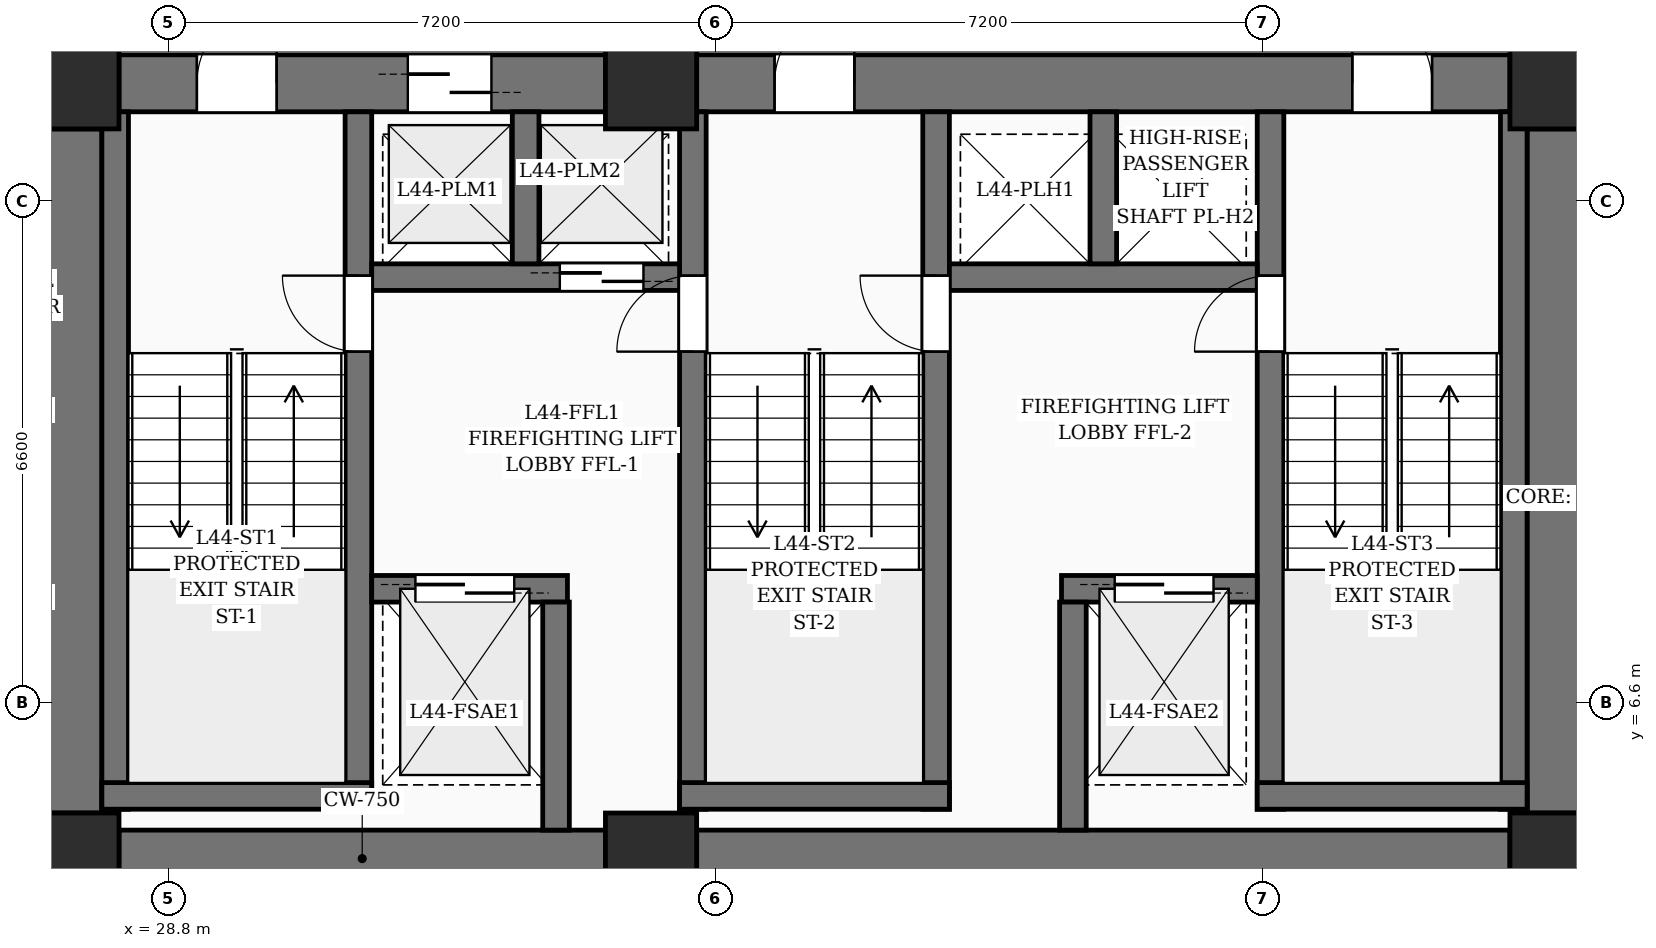
"""IFC4 building model, lengths in metres.
Left out: names, types, materials, properties, quantities, classifications, styles, units other than length and angle.
Written with IfcOpenShell. Run it as: python <this file> out.ifc"""

import sys

from ifc_helpers import new_model, si_unit, direction, frame, frame_2d, origin, origin_2d, place, context, subcontext, project, spatial, rectangle, extrude, element, fill, save


model = new_model("IFC4")
c1 = context("Model", 3, precision=1e-05, world=origin(), true_north=direction((0.0, 1.0)))
c2 = subcontext(c1, "Body", "Model", "MODEL_VIEW")
j1 = project(units=[si_unit("LENGTHUNIT", "METRE"), si_unit("PLANEANGLEUNIT", "RADIAN")], contexts=[c1])
p1 = place(None, origin())
s1 = spatial("IfcSite", under=j1, at=p1, CompositionType="ELEMENT")
p2 = place(p1, origin())
s2 = spatial("IfcBuilding", under=s1, at=p2, CompositionType="ELEMENT")
p3 = place(p2, frame((0.0, 0.0, 171.6)))
s3 = spatial("IfcBuildingStorey", under=s2, at=p3, CompositionType="ELEMENT", Elevation=171.6)
for number, where, z_axis, x_axis in (
    (1, (27.55, 4.55, 0.0), (0.0, 0.0, 1.0), (1.0, 0.0, 0.0)),
    (2, (35.15, 4.55, 0.0), (0.0, 0.0, 1.0), (1.0, 0.0, 0.0)),
    (3, (47.05, 4.55, 0.0), (0.0, 0.0, 1.0), (1.0, 0.0, 0.0)),
    (4, (27.55, 14.75, 0.0), (0.0, 0.0, 1.0), (1.0, 0.0, 0.0)),
    (5, (35.15, 14.75, 0.0), (0.0, 0.0, 1.0), (1.0, 0.0, 0.0)),
    (6, (47.05, 14.75, 0.0), (0.0, 0.0, 1.0), (1.0, 0.0, 0.0)),
):
    element("IfcColumn", number, at=place(p3, frame(where, z_axis=z_axis, x_axis=x_axis)), inside=s3, PredefinedType="COLUMN", context=c2, shape_type="SweptSolid", body=[
        extrude(rectangle(XDim=1.2, YDim=1.2, at=origin_2d()), origin(), (0.0, 0.0, 1.0), 3.6),
    ])
p4 = place(p3, frame((28.15, 4.55, 0.0), z_axis=(0.0, 0.0, 1.0), x_axis=(1.0, 0.0, 0.0)))
e7 = element("IfcWall", 7, at=p4, inside=s3, PredefinedType="SHEAR", context=c2, shape_type="SweptSolid", body=[
    extrude(rectangle(XDim=6.4, YDim=0.75, at=frame_2d((3.2, 0.0))), origin(), (0.0, 0.0, 1.0), 3.6),
])
p5 = place(p3, frame((35.75, 4.55, 0.0), z_axis=(0.0, 0.0, 1.0), x_axis=(1.0, 0.0, 0.0)))
e8 = element("IfcWall", 8, at=p5, inside=s3, PredefinedType="SHEAR", context=c2, shape_type="SweptSolid", body=[
    extrude(rectangle(XDim=10.7, YDim=0.75, at=frame_2d((5.35, 0.0))), origin(), (0.0, 0.0, 1.0), 3.6),
])
p6 = place(p3, frame((28.15, 14.75, 0.0), z_axis=(0.0, 0.0, 1.0), x_axis=(1.0, 0.0, 0.0)))
e9 = element("IfcWall", 9, at=p6, inside=s3, PredefinedType="SHEAR", context=c2, shape_type="SweptSolid", body=[
    extrude(rectangle(XDim=6.4, YDim=0.75, at=frame_2d((3.2, 0.0))), origin(), (0.0, 0.0, 1.0), 3.6),
])
p7 = place(p6, frame((1.025, 0.0, 0.0)))
e10 = element("IfcOpeningElement", 10, at=p7, cuts=e9, PredefinedType="OPENING", context=c2, shape_type="SweptSolid", body=[
    extrude(rectangle(XDim=1.05, YDim=2.15, at=frame_2d((0.525, 1.075))), frame((0.0, 0.385, 0.0), z_axis=(0.0, -1.0, 0.0), x_axis=(1.0, 0.0, 0.0)), (0.0, 0.0, 1.0), 0.77),
])
p8 = place(p6, frame((3.8, 0.0, 0.0)))
e11 = element("IfcOpeningElement", 11, at=p8, cuts=e9, PredefinedType="OPENING", context=c2, shape_type="SweptSolid", body=[
    extrude(rectangle(XDim=1.1, YDim=2.2, at=frame_2d((0.55, 1.1))), frame((0.0, 0.385, 0.0), z_axis=(0.0, -1.0, 0.0), x_axis=(1.0, 0.0, 0.0)), (0.0, 0.0, 1.0), 0.77),
])
p9 = place(p3, frame((35.75, 14.75, 0.0), z_axis=(0.0, 0.0, 1.0), x_axis=(1.0, 0.0, 0.0)))
e12 = element("IfcWall", 12, at=p9, inside=s3, PredefinedType="SHEAR", context=c2, shape_type="SweptSolid", body=[
    extrude(rectangle(XDim=10.7, YDim=0.75, at=frame_2d((5.35, 0.0))), origin(), (0.0, 0.0, 1.0), 3.6),
])
p10 = place(p9, frame((1.025, 0.0, 0.0)))
e13 = element("IfcOpeningElement", 13, at=p10, cuts=e12, PredefinedType="OPENING", context=c2, shape_type="SweptSolid", body=[
    extrude(rectangle(XDim=1.05, YDim=2.15, at=frame_2d((0.525, 1.075))), frame((0.0, 0.385, 0.0), z_axis=(0.0, -1.0, 0.0), x_axis=(1.0, 0.0, 0.0)), (0.0, 0.0, 1.0), 0.77),
])
p11 = place(p9, frame((8.625, 0.0, 0.0)))
e14 = element("IfcOpeningElement", 14, at=p11, cuts=e12, PredefinedType="OPENING", context=c2, shape_type="SweptSolid", body=[
    extrude(rectangle(XDim=1.05, YDim=2.15, at=frame_2d((0.525, 1.075))), frame((0.0, 0.385, 0.0), z_axis=(0.0, -1.0, 0.0), x_axis=(1.0, 0.0, 0.0)), (0.0, 0.0, 1.0), 0.77),
])
for number, where, z_axis, x_axis in (
    (15, (27.55, 5.15, 0.0), (0.0, 0.0, 1.0), (0.0, 1.0, 0.0)),
    (16, (47.05, 5.15, 0.0), (0.0, 0.0, 1.0), (0.0, 1.0, 0.0)),
):
    element("IfcWall", number, at=place(p3, frame(where, z_axis=z_axis, x_axis=x_axis)), inside=s3, PredefinedType="SHEAR", context=c2, shape_type="SweptSolid", body=[
        extrude(rectangle(XDim=9.0, YDim=0.75, at=frame_2d((4.5, 0.0))), origin(), (0.0, 0.0, 1.0), 3.6),
    ])
p12 = place(p3, frame((28.1, 5.2, 0.0), z_axis=(0.0, 0.0, 1.0), x_axis=(0.0, 1.0, 0.0)))
e17 = element("IfcWall", 17, at=p12, inside=s3, PredefinedType="SOLIDWALL", context=c2, shape_type="SweptSolid", body=[
    extrude(rectangle(XDim=9.175, YDim=0.35, at=frame_2d((4.587, 0.0))), origin(), (0.0, 0.0, 1.0), 3.6),
])
p13 = place(p3, frame((31.3, 5.2, 0.0), z_axis=(0.0, 0.0, 1.0), x_axis=(0.0, 1.0, 0.0)))
e18 = element("IfcWall", 18, at=p13, inside=s3, PredefinedType="SOLIDWALL", context=c2, shape_type="SweptSolid", body=[
    extrude(rectangle(XDim=9.175, YDim=0.35, at=frame_2d((4.587, 0.0))), origin(), (0.0, 0.0, 1.0), 3.6),
])
p14 = place(p13, frame((6.02, 0.0, 0.0)))
e19 = element("IfcOpeningElement", 19, at=p14, cuts=e18, PredefinedType="OPENING", context=c2, shape_type="SweptSolid", body=[
    extrude(rectangle(XDim=1.0, YDim=2.15, at=frame_2d((0.5, 1.075))), frame((0.0, 0.185, 0.0), z_axis=(0.0, -1.0, 0.0), x_axis=(1.0, 0.0, 0.0)), (0.0, 0.0, 1.0), 0.37),
])
p15 = place(p3, frame((27.925, 5.375, 0.0), z_axis=(0.0, 0.0, 1.0), x_axis=(1.0, 0.0, 0.0)))
e20 = element("IfcWall", 20, at=p15, inside=s3, PredefinedType="SOLIDWALL", context=c2, shape_type="SweptSolid", body=[
    extrude(rectangle(XDim=3.55, YDim=0.35, at=frame_2d((1.775, 0.0))), origin(), (0.0, 0.0, 1.0), 3.6),
])
p16 = place(p3, frame((35.7, 5.2, 0.0), z_axis=(0.0, 0.0, 1.0), x_axis=(0.0, 1.0, 0.0)))
e21 = element("IfcWall", 21, at=p16, inside=s3, PredefinedType="SOLIDWALL", context=c2, shape_type="SweptSolid", body=[
    extrude(rectangle(XDim=9.175, YDim=0.35, at=frame_2d((4.587, 0.0))), origin(), (0.0, 0.0, 1.0), 3.6),
])
p17 = place(p16, frame((6.02, 0.0, 0.0)))
e22 = element("IfcOpeningElement", 22, at=p17, cuts=e21, PredefinedType="OPENING", context=c2, shape_type="SweptSolid", body=[
    extrude(rectangle(XDim=1.0, YDim=2.15, at=frame_2d((0.5, 1.075))), frame((0.0, 0.185, 0.0), z_axis=(0.0, -1.0, 0.0), x_axis=(1.0, 0.0, 0.0)), (0.0, 0.0, 1.0), 0.37),
])
p18 = place(p3, frame((38.9, 5.2, 0.0), z_axis=(0.0, 0.0, 1.0), x_axis=(0.0, 1.0, 0.0)))
e23 = element("IfcWall", 23, at=p18, inside=s3, PredefinedType="SOLIDWALL", context=c2, shape_type="SweptSolid", body=[
    extrude(rectangle(XDim=9.175, YDim=0.35, at=frame_2d((4.587, 0.0))), origin(), (0.0, 0.0, 1.0), 3.6),
])
p19 = place(p18, frame((6.02, 0.0, 0.0)))
e24 = element("IfcOpeningElement", 24, at=p19, cuts=e23, PredefinedType="OPENING", context=c2, shape_type="SweptSolid", body=[
    extrude(rectangle(XDim=1.0, YDim=2.15, at=frame_2d((0.5, 1.075))), frame((0.0, 0.185, 0.0), z_axis=(0.0, -1.0, 0.0), x_axis=(1.0, 0.0, 0.0)), (0.0, 0.0, 1.0), 0.37),
])
p20 = place(p3, frame((35.525, 5.375, 0.0), z_axis=(0.0, 0.0, 1.0), x_axis=(1.0, 0.0, 0.0)))
e25 = element("IfcWall", 25, at=p20, inside=s3, PredefinedType="SOLIDWALL", context=c2, shape_type="SweptSolid", body=[
    extrude(rectangle(XDim=3.55, YDim=0.35, at=frame_2d((1.775, 0.0))), origin(), (0.0, 0.0, 1.0), 3.6),
])
p21 = place(p3, frame((43.3, 5.2, 0.0), z_axis=(0.0, 0.0, 1.0), x_axis=(0.0, 1.0, 0.0)))
e26 = element("IfcWall", 26, at=p21, inside=s3, PredefinedType="SOLIDWALL", context=c2, shape_type="SweptSolid", body=[
    extrude(rectangle(XDim=9.175, YDim=0.35, at=frame_2d((4.587, 0.0))), origin(), (0.0, 0.0, 1.0), 3.6),
])
p22 = place(p21, frame((6.02, 0.0, 0.0)))
e27 = element("IfcOpeningElement", 27, at=p22, cuts=e26, PredefinedType="OPENING", context=c2, shape_type="SweptSolid", body=[
    extrude(rectangle(XDim=1.0, YDim=2.15, at=frame_2d((0.5, 1.075))), frame((0.0, 0.185, 0.0), z_axis=(0.0, -1.0, 0.0), x_axis=(1.0, 0.0, 0.0)), (0.0, 0.0, 1.0), 0.37),
])
p23 = place(p3, frame((46.5, 5.2, 0.0), z_axis=(0.0, 0.0, 1.0), x_axis=(0.0, 1.0, 0.0)))
e28 = element("IfcWall", 28, at=p23, inside=s3, PredefinedType="SOLIDWALL", context=c2, shape_type="SweptSolid", body=[
    extrude(rectangle(XDim=9.175, YDim=0.35, at=frame_2d((4.587, 0.0))), origin(), (0.0, 0.0, 1.0), 3.6),
])
p24 = place(p3, frame((43.125, 5.375, 0.0), z_axis=(0.0, 0.0, 1.0), x_axis=(1.0, 0.0, 0.0)))
e29 = element("IfcWall", 29, at=p24, inside=s3, PredefinedType="SOLIDWALL", context=c2, shape_type="SweptSolid", body=[
    extrude(rectangle(XDim=3.55, YDim=0.35, at=frame_2d((1.775, 0.0))), origin(), (0.0, 0.0, 1.0), 3.6),
])
p25 = place(p3, frame((31.475, 8.1, 0.0), z_axis=(0.0, 0.0, 1.0), x_axis=(1.0, 0.0, 0.0)))
e30 = element("IfcWall", 30, at=p25, inside=s3, PredefinedType="SOLIDWALL", context=c2, shape_type="SweptSolid", body=[
    extrude(rectangle(XDim=2.575, YDim=0.35, at=frame_2d((1.288, 0.0))), origin(), (0.0, 0.0, 1.0), 3.6),
])
p26 = place(p25, frame((0.575, 0.0, 0.0)))
e31 = element("IfcOpeningElement", 31, at=p26, cuts=e30, PredefinedType="OPENING", context=c2, shape_type="SweptSolid", body=[
    extrude(rectangle(XDim=1.3, YDim=2.25, at=frame_2d((0.65, 1.125))), frame((0.0, 0.185, 0.0), z_axis=(0.0, -1.0, 0.0), x_axis=(1.0, 0.0, 0.0)), (0.0, 0.0, 1.0), 0.37),
])
p27 = place(p3, frame((40.55, 8.1, 0.0), z_axis=(0.0, 0.0, 1.0), x_axis=(1.0, 0.0, 0.0)))
e32 = element("IfcWall", 32, at=p27, inside=s3, PredefinedType="SOLIDWALL", context=c2, shape_type="SweptSolid", body=[
    extrude(rectangle(XDim=2.575, YDim=0.35, at=frame_2d((1.288, 0.0))), origin(), (0.0, 0.0, 1.0), 3.6),
])
p28 = place(p27, frame((0.7, 0.0, 0.0)))
e33 = element("IfcOpeningElement", 33, at=p28, cuts=e32, PredefinedType="OPENING", context=c2, shape_type="SweptSolid", body=[
    extrude(rectangle(XDim=1.3, YDim=2.25, at=frame_2d((0.65, 1.125))), frame((0.0, 0.185, 0.0), z_axis=(0.0, -1.0, 0.0), x_axis=(1.0, 0.0, 0.0)), (0.0, 0.0, 1.0), 0.37),
])
for number, where, z_axis, x_axis in (
    (34, (33.9, 4.925, 0.0), (0.0, 0.0, 1.0), (0.0, 1.0, 0.0)),
    (35, (40.7, 4.925, 0.0), (0.0, 0.0, 1.0), (0.0, 1.0, 0.0)),
):
    element("IfcWall", number, at=place(p3, frame(where, z_axis=z_axis, x_axis=x_axis)), inside=s3, PredefinedType="SOLIDWALL", context=c2, shape_type="SweptSolid", body=[
        extrude(rectangle(XDim=3.0, YDim=0.35, at=frame_2d((1.5, 0.0))), origin(), (0.0, 0.0, 1.0), 3.6),
    ])
p29 = place(p3, frame((31.475, 12.2, 0.0), z_axis=(0.0, 0.0, 1.0), x_axis=(1.0, 0.0, 0.0)))
e36 = element("IfcWall", 36, at=p29, inside=s3, PredefinedType="SOLIDWALL", context=c2, shape_type="SweptSolid", body=[
    extrude(rectangle(XDim=4.05, YDim=0.35, at=frame_2d((2.025, 0.0))), origin(), (0.0, 0.0, 1.0), 3.6),
])
p30 = place(p29, frame((2.475, 0.0, 0.0)))
e37 = element("IfcOpeningElement", 37, at=p30, cuts=e36, PredefinedType="OPENING", context=c2, shape_type="SweptSolid", body=[
    extrude(rectangle(XDim=1.1, YDim=2.2, at=frame_2d((0.55, 1.1))), frame((0.0, 0.185, 0.0), z_axis=(0.0, -1.0, 0.0), x_axis=(1.0, 0.0, 0.0)), (0.0, 0.0, 1.0), 0.37),
])
p31 = place(p3, frame((33.5, 12.375, 0.0), z_axis=(0.0, 0.0, 1.0), x_axis=(0.0, 1.0, 0.0)))
e38 = element("IfcWall", 38, at=p31, inside=s3, PredefinedType="SOLIDWALL", context=c2, shape_type="SweptSolid", body=[
    extrude(rectangle(XDim=2.0, YDim=0.35, at=frame_2d((1.0, 0.0))), origin(), (0.0, 0.0, 1.0), 3.6),
])
p32 = place(p3, frame((39.075, 12.2, 0.0), z_axis=(0.0, 0.0, 1.0), x_axis=(1.0, 0.0, 0.0)))
e39 = element("IfcWall", 39, at=p32, inside=s3, PredefinedType="SOLIDWALL", context=c2, shape_type="SweptSolid", body=[
    extrude(rectangle(XDim=4.05, YDim=0.35, at=frame_2d((2.025, 0.0))), origin(), (0.0, 0.0, 1.0), 3.6),
])
p33 = place(p3, frame((41.1, 12.375, 0.0), z_axis=(0.0, 0.0, 1.0), x_axis=(0.0, 1.0, 0.0)))
e40 = element("IfcWall", 40, at=p33, inside=s3, PredefinedType="SOLIDWALL", context=c2, shape_type="SweptSolid", body=[
    extrude(rectangle(XDim=2.0, YDim=0.35, at=frame_2d((1.0, 0.0))), origin(), (0.0, 0.0, 1.0), 3.6),
])
p34 = place(p7, origin())
e41 = element("IfcDoor", 41, at=p34, inside=s3, OperationType="SINGLE_SWING_RIGHT", PredefinedType="DOOR", context=c2, shape_type="SweptSolid", body=[
    extrude(rectangle(XDim=1.05, YDim=2.15, at=frame_2d((0.525, 1.075))), frame((0.0, 0.025, 0.0), z_axis=(0.0, -1.0, 0.0), x_axis=(1.0, 0.0, 0.0)), (0.0, 0.0, 1.0), 0.05),
])
fill(e10, e41)
p35 = place(p10, origin())
e42 = element("IfcDoor", 42, at=p35, inside=s3, OperationType="SINGLE_SWING_RIGHT", PredefinedType="DOOR", context=c2, shape_type="SweptSolid", body=[
    extrude(rectangle(XDim=1.05, YDim=2.15, at=frame_2d((0.525, 1.075))), frame((0.0, 0.025, 0.0), z_axis=(0.0, -1.0, 0.0), x_axis=(1.0, 0.0, 0.0)), (0.0, 0.0, 1.0), 0.05),
])
fill(e13, e42)
p36 = place(p11, origin())
e43 = element("IfcDoor", 43, at=p36, inside=s3, OperationType="SINGLE_SWING_LEFT", PredefinedType="DOOR", context=c2, shape_type="SweptSolid", body=[
    extrude(rectangle(XDim=1.05, YDim=2.15, at=frame_2d((0.525, 1.075))), frame((0.0, 0.025, 0.0), z_axis=(0.0, -1.0, 0.0), x_axis=(1.0, 0.0, 0.0)), (0.0, 0.0, 1.0), 0.05),
])
fill(e14, e43)
p37 = place(p14, origin())
e44 = element("IfcDoor", 44, at=p37, inside=s3, OperationType="SINGLE_SWING_RIGHT", PredefinedType="DOOR", context=c2, shape_type="SweptSolid", body=[
    extrude(rectangle(XDim=1.0, YDim=2.15, at=frame_2d((0.5, 1.075))), frame((0.0, 0.025, 0.0), z_axis=(0.0, -1.0, 0.0), x_axis=(1.0, 0.0, 0.0)), (0.0, 0.0, 1.0), 0.05),
])
fill(e19, e44)
p38 = place(p17, origin())
e45 = element("IfcDoor", 45, at=p38, inside=s3, OperationType="SINGLE_SWING_LEFT", PredefinedType="DOOR", context=c2, shape_type="SweptSolid", body=[
    extrude(rectangle(XDim=1.0, YDim=2.15, at=frame_2d((0.5, 1.075))), frame((0.0, 0.025, 0.0), z_axis=(0.0, -1.0, 0.0), x_axis=(1.0, 0.0, 0.0)), (0.0, 0.0, 1.0), 0.05),
])
fill(e22, e45)
p39 = place(p19, origin())
e46 = element("IfcDoor", 46, at=p39, inside=s3, OperationType="SINGLE_SWING_RIGHT", PredefinedType="DOOR", context=c2, shape_type="SweptSolid", body=[
    extrude(rectangle(XDim=1.0, YDim=2.15, at=frame_2d((0.5, 1.075))), frame((0.0, 0.025, 0.0), z_axis=(0.0, -1.0, 0.0), x_axis=(1.0, 0.0, 0.0)), (0.0, 0.0, 1.0), 0.05),
])
fill(e24, e46)
p40 = place(p22, origin())
e47 = element("IfcDoor", 47, at=p40, inside=s3, OperationType="SINGLE_SWING_LEFT", PredefinedType="DOOR", context=c2, shape_type="SweptSolid", body=[
    extrude(rectangle(XDim=1.0, YDim=2.15, at=frame_2d((0.5, 1.075))), frame((0.0, 0.025, 0.0), z_axis=(0.0, -1.0, 0.0), x_axis=(1.0, 0.0, 0.0)), (0.0, 0.0, 1.0), 0.05),
])
fill(e27, e47)
p41 = place(p26, origin())
e48 = element("IfcDoor", 48, at=p41, inside=s3, OperationType="DOUBLE_DOOR_SLIDING", PredefinedType="DOOR", context=c2, shape_type="SweptSolid", body=[
    extrude(rectangle(XDim=1.3, YDim=2.25, at=frame_2d((0.65, 1.125))), frame((0.0, 0.025, 0.0), z_axis=(0.0, -1.0, 0.0), x_axis=(1.0, 0.0, 0.0)), (0.0, 0.0, 1.0), 0.05),
])
fill(e31, e48)
p42 = place(p28, origin())
e49 = element("IfcDoor", 49, at=p42, inside=s3, OperationType="DOUBLE_DOOR_SLIDING", PredefinedType="DOOR", context=c2, shape_type="SweptSolid", body=[
    extrude(rectangle(XDim=1.3, YDim=2.25, at=frame_2d((0.65, 1.125))), frame((0.0, 0.025, 0.0), z_axis=(0.0, -1.0, 0.0), x_axis=(1.0, 0.0, 0.0)), (0.0, 0.0, 1.0), 0.05),
])
fill(e33, e49)
p43 = place(p8, origin())
e50 = element("IfcDoor", 50, at=p43, inside=s3, OperationType="DOUBLE_DOOR_SLIDING", PredefinedType="DOOR", context=c2, shape_type="SweptSolid", body=[
    extrude(rectangle(XDim=1.1, YDim=2.2, at=frame_2d((0.55, 1.1))), frame((0.0, 0.025, 0.0), z_axis=(0.0, -1.0, 0.0), x_axis=(1.0, 0.0, 0.0)), (0.0, 0.0, 1.0), 0.05),
])
fill(e11, e50)
p44 = place(p30, origin())
e51 = element("IfcDoor", 51, at=p44, inside=s3, OperationType="DOUBLE_DOOR_SLIDING", PredefinedType="DOOR", context=c2, shape_type="SweptSolid", body=[
    extrude(rectangle(XDim=1.1, YDim=2.2, at=frame_2d((0.55, 1.1))), frame((0.0, 0.025, 0.0), z_axis=(0.0, -1.0, 0.0), x_axis=(1.0, 0.0, 0.0)), (0.0, 0.0, 1.0), 0.05),
])
fill(e37, e51)
save(model, sys.argv[1])
